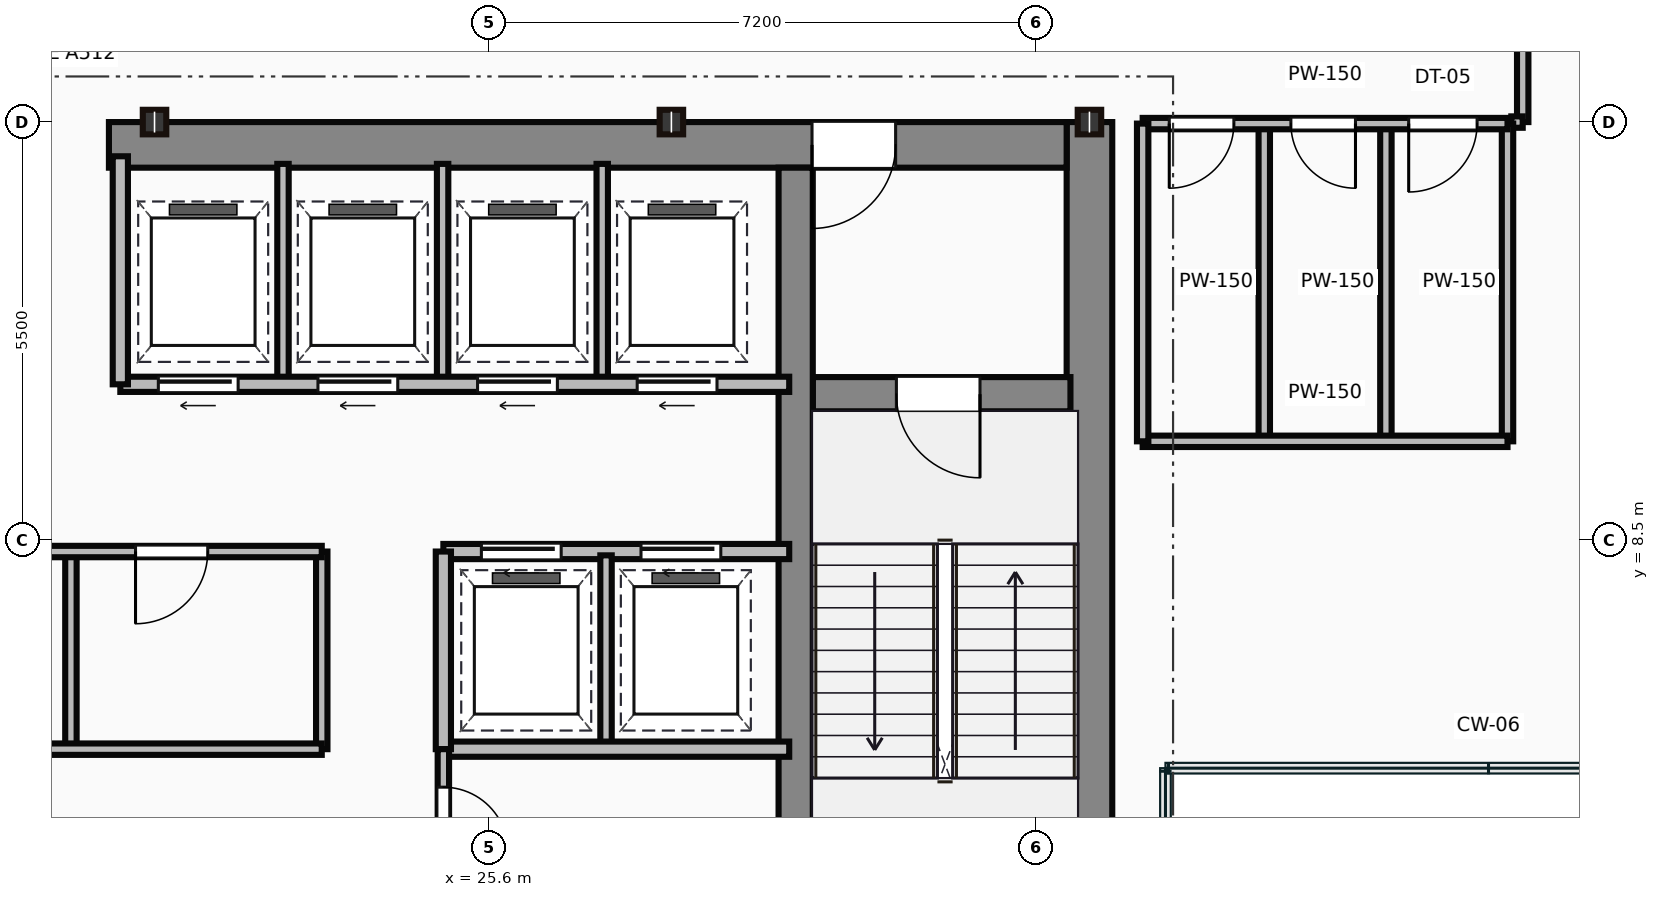
"""IFC4 building model, lengths in metres.
Left out: names, types, materials, properties, quantities, classifications, styles, units other than length and angle.
Written with IfcOpenShell. Run it as: python <this file> out.ifc"""

import sys

from ifc_helpers import new_model, si_unit, direction, frame, frame_2d, origin, origin_2d, place, context, subcontext, project, spatial, rectangle, i_section, extrude, source, transform, mapped, element, fill, save


model = new_model("IFC4")
c1 = context("Model", 3, precision=1e-05, world=origin(), true_north=direction((0.0, 1.0)))
c2 = subcontext(c1, "Body", "Model", "MODEL_VIEW")
j1 = project(units=[si_unit("LENGTHUNIT", "METRE"), si_unit("PLANEANGLEUNIT", "RADIAN")], contexts=[c1])
p1 = place(None, origin())
s1 = spatial("IfcSite", under=j1, at=p1, CompositionType="ELEMENT")
p2 = place(p1, origin())
s2 = spatial("IfcBuilding", under=s1, at=p2, CompositionType="ELEMENT")
p3 = place(p2, frame((0.0, 0.0, 288.0)))
s3 = spatial("IfcBuildingStorey", under=s2, at=p3, CompositionType="ELEMENT", Elevation=288.0)
m1 = source(origin(), c2, "Body", "SweptSolid", [
    extrude(rectangle(XDim=13.1, YDim=0.6, at=frame_2d((6.55, 0.0))), origin(), (0.0, 0.0, 1.0), 4.25),
])
p4 = place(p3, frame((33.5, 0.9, 0.0), z_axis=(0.0, 0.0, 1.0), x_axis=(0.0, 1.0, 0.0)))
e1 = element("IfcWall", 1, at=p4, inside=s3, PredefinedType="SHEAR", context=c2, shape_type="MappedRepresentation", body=[
    mapped(m1, transform((0.0, 0.0, 0.0))),
])
m2 = source(origin(), c2, "Body", "SweptSolid", [
    extrude(rectangle(XDim=12.6, YDim=0.6, at=frame_2d((6.3, 0.0))), origin(), (0.0, 0.0, 1.0), 4.25),
])
p5 = place(p3, frame((20.6, 13.7, 0.0), z_axis=(0.0, 0.0, 1.0), x_axis=(1.0, 0.0, 0.0)))
e2 = element("IfcWall", 2, at=p5, inside=s3, PredefinedType="SHEAR", context=c2, shape_type="MappedRepresentation", body=[
    mapped(m2, transform((0.0, 0.0, 0.0))),
])
p6 = place(p5, frame((9.25, 0.0, 0.0)))
e3 = element("IfcOpeningElement", 3, at=p6, cuts=e2, PredefinedType="OPENING", context=c2, shape_type="SweptSolid", body=[
    extrude(rectangle(XDim=1.1, YDim=2.15, at=frame_2d((0.55, 1.075))), frame((0.0, 0.31, 0.0), z_axis=(0.0, -1.0, 0.0), x_axis=(1.0, 0.0, 0.0)), (0.0, 0.0, 1.0), 0.62),
])
m3 = source(origin(), c2, "Body", "SweptSolid", [
    extrude(rectangle(XDim=12.5, YDim=0.45, at=frame_2d((6.25, 0.0))), origin(), (0.0, 0.0, 1.0), 4.25),
])
p7 = place(p3, frame((29.635, 0.9, 0.0), z_axis=(0.0, 0.0, 1.0), x_axis=(0.0, 1.0, 0.0)))
e4 = element("IfcWall", 4, at=p7, inside=s3, PredefinedType="SHEAR", context=c2, shape_type="MappedRepresentation", body=[
    mapped(m3, transform((0.0, 0.0, 0.0))),
])
m4 = source(origin(), c2, "Body", "SweptSolid", [
    extrude(rectangle(XDim=3.39, YDim=0.45, at=frame_2d((1.695, 0.0))), origin(), (0.0, 0.0, 1.0), 4.25),
])
p8 = place(p3, frame((29.86, 10.42, 0.0), z_axis=(0.0, 0.0, 1.0), x_axis=(1.0, 0.0, 0.0)))
e5 = element("IfcWall", 5, at=p8, inside=s3, PredefinedType="SHEAR", context=c2, shape_type="MappedRepresentation", body=[
    mapped(m4, transform((0.0, 0.0, 0.0))),
])
p9 = place(p8, frame((1.1, 0.0, 0.0)))
e6 = element("IfcOpeningElement", 6, at=p9, cuts=e5, PredefinedType="OPENING", context=c2, shape_type="SweptSolid", body=[
    extrude(rectangle(XDim=1.1, YDim=2.15, at=frame_2d((0.55, 1.075))), frame((0.0, 0.235, 0.0), z_axis=(0.0, -1.0, 0.0), x_axis=(1.0, 0.0, 0.0)), (0.0, 0.0, 1.0), 0.47),
])
m5 = source(origin(), c2, "Body", "SweptSolid", [
    extrude(i_section(OverallWidth=0.309, OverallDepth=0.323, WebThickness=0.014, FlangeThickness=0.023, at=origin_2d()), origin(), (0.0, 0.0, 1.0), 4.25),
])
for number, where, z_axis, x_axis in (
    (7, (21.2, 14.0, 0.0), (0.0, 0.0, 1.0), (1.0, 0.0, 0.0)),
    (8, (28.0, 14.0, 0.0), (0.0, 0.0, 1.0), (1.0, 0.0, 0.0)),
    (9, (33.5, 14.0, 0.0), (0.0, 0.0, 1.0), (1.0, 0.0, 0.0)),
):
    element("IfcColumn", number, at=place(p3, frame(where, z_axis=z_axis, x_axis=x_axis)), inside=s3, PredefinedType="COLUMN", context=c2, shape_type="MappedRepresentation", body=[
        mapped(m5, transform((0.0, 0.0, 0.0))),
    ])
m6 = source(origin(), c2, "Body", "SweptSolid", [
    extrude(rectangle(XDim=11.85, YDim=0.15, at=frame_2d((5.925, 0.0))), origin(), (0.0, 0.0, 1.0), 3.85),
])
p10 = place(p3, frame((11.55, 5.75, 0.0), z_axis=(0.0, 0.0, 1.0), x_axis=(1.0, 0.0, 0.0)))
e10 = element("IfcWall", 10, at=p10, inside=s3, PredefinedType="PARTITIONING", context=c2, shape_type="MappedRepresentation", body=[
    mapped(m6, transform((0.0, 0.0, 0.0))),
])
p11 = place(p3, frame((11.55, 8.35, 0.0), z_axis=(0.0, 0.0, 1.0), x_axis=(1.0, 0.0, 0.0)))
e11 = element("IfcWall", 11, at=p11, inside=s3, PredefinedType="PARTITIONING", context=c2, shape_type="MappedRepresentation", body=[
    mapped(m6, transform((0.0, 0.0, 0.0))),
])
p12 = place(p11, frame((1.1, 0.0, 0.0)))
e12 = element("IfcOpeningElement", 12, at=p12, cuts=e11, PredefinedType="OPENING", context=c2, shape_type="SweptSolid", body=[
    extrude(rectangle(XDim=0.95, YDim=2.15, at=frame_2d((0.475, 1.075))), frame((0.0, 0.085, 0.0), z_axis=(0.0, -1.0, 0.0), x_axis=(1.0, 0.0, 0.0)), (0.0, 0.0, 1.0), 0.17),
])
p13 = place(p11, frame((9.4, 0.0, 0.0)))
e13 = element("IfcOpeningElement", 13, at=p13, cuts=e11, PredefinedType="OPENING", context=c2, shape_type="SweptSolid", body=[
    extrude(rectangle(XDim=0.95, YDim=2.15, at=frame_2d((0.475, 1.075))), frame((0.0, 0.085, 0.0), z_axis=(0.0, -1.0, 0.0), x_axis=(1.0, 0.0, 0.0)), (0.0, 0.0, 1.0), 0.17),
])
m7 = source(origin(), c2, "Body", "SweptSolid", [
    extrude(rectangle(XDim=2.6, YDim=0.15, at=frame_2d((1.3, 0.0))), origin(), (0.0, 0.0, 1.0), 3.85),
])
p14 = place(p3, frame((23.4, 5.75, 0.0), z_axis=(0.0, 0.0, 1.0), x_axis=(0.0, 1.0, 0.0)))
e14 = element("IfcWall", 14, at=p14, inside=s3, PredefinedType="PARTITIONING", context=c2, shape_type="MappedRepresentation", body=[
    mapped(m7, transform((0.0, 0.0, 0.0))),
])
m8 = source(origin(), c2, "Body", "SweptSolid", [
    extrude(rectangle(XDim=2.5, YDim=0.15, at=frame_2d((1.25, 0.0))), origin(), (0.0, 0.0, 1.0), 3.85),
])
p15 = place(p3, frame((20.1, 5.8, 0.0), z_axis=(0.0, 0.0, 1.0), x_axis=(0.0, 1.0, 0.0)))
e15 = element("IfcWall", 15, at=p15, inside=s3, PredefinedType="PARTITIONING", context=c2, shape_type="MappedRepresentation", body=[
    mapped(m8, transform((0.0, 0.0, 0.0))),
])
m9 = source(origin(), c2, "Body", "SweptSolid", [
    extrude(rectangle(XDim=8.8, YDim=0.2, at=frame_2d((4.4, 0.0))), origin(), (0.0, 0.0, 1.0), 3.85),
])
p16 = place(p3, frame((20.75, 10.55, 0.0), z_axis=(0.0, 0.0, 1.0), x_axis=(1.0, 0.0, 0.0)))
e16 = element("IfcWall", 16, at=p16, inside=s3, PredefinedType="PARTITIONING", context=c2, shape_type="MappedRepresentation", body=[
    mapped(m9, transform((0.0, 0.0, 0.0))),
])
p17 = place(p16, frame((0.5, 0.0, 0.0)))
e17 = element("IfcOpeningElement", 17, at=p17, cuts=e16, PredefinedType="OPENING", context=c2, shape_type="SweptSolid", body=[
    extrude(rectangle(XDim=1.05, YDim=2.15, at=frame_2d((0.525, 1.075))), frame((0.0, 0.11, 0.0), z_axis=(0.0, -1.0, 0.0), x_axis=(1.0, 0.0, 0.0)), (0.0, 0.0, 1.0), 0.22),
])
p18 = place(p16, frame((2.6, 0.0, 0.0)))
e18 = element("IfcOpeningElement", 18, at=p18, cuts=e16, PredefinedType="OPENING", context=c2, shape_type="SweptSolid", body=[
    extrude(rectangle(XDim=1.05, YDim=2.15, at=frame_2d((0.525, 1.075))), frame((0.0, 0.11, 0.0), z_axis=(0.0, -1.0, 0.0), x_axis=(1.0, 0.0, 0.0)), (0.0, 0.0, 1.0), 0.22),
])
p19 = place(p16, frame((4.7, 0.0, 0.0)))
e19 = element("IfcOpeningElement", 19, at=p19, cuts=e16, PredefinedType="OPENING", context=c2, shape_type="SweptSolid", body=[
    extrude(rectangle(XDim=1.05, YDim=2.15, at=frame_2d((0.525, 1.075))), frame((0.0, 0.11, 0.0), z_axis=(0.0, -1.0, 0.0), x_axis=(1.0, 0.0, 0.0)), (0.0, 0.0, 1.0), 0.22),
])
p20 = place(p16, frame((6.8, 0.0, 0.0)))
e20 = element("IfcOpeningElement", 20, at=p20, cuts=e16, PredefinedType="OPENING", context=c2, shape_type="SweptSolid", body=[
    extrude(rectangle(XDim=1.05, YDim=2.15, at=frame_2d((0.525, 1.075))), frame((0.0, 0.11, 0.0), z_axis=(0.0, -1.0, 0.0), x_axis=(1.0, 0.0, 0.0)), (0.0, 0.0, 1.0), 0.22),
])
m10 = source(origin(), c2, "Body", "SweptSolid", [
    extrude(rectangle(XDim=3.0, YDim=0.2, at=frame_2d((1.5, 0.0))), origin(), (0.0, 0.0, 1.0), 3.85),
])
p21 = place(p3, frame((20.75, 10.55, 0.0), z_axis=(0.0, 0.0, 1.0), x_axis=(0.0, 1.0, 0.0)))
e21 = element("IfcWall", 21, at=p21, inside=s3, PredefinedType="PARTITIONING", context=c2, shape_type="MappedRepresentation", body=[
    mapped(m10, transform((0.0, 0.0, 0.0))),
])
m11 = source(origin(), c2, "Body", "SweptSolid", [
    extrude(rectangle(XDim=2.85, YDim=0.15, at=frame_2d((1.425, 0.0))), origin(), (0.0, 0.0, 1.0), 3.85),
])
for number, where, z_axis, x_axis in (
    (22, (22.89, 10.6, 0.0), (0.0, 0.0, 1.0), (0.0, 1.0, 0.0)),
    (23, (24.99, 10.6, 0.0), (0.0, 0.0, 1.0), (0.0, 1.0, 0.0)),
    (24, (27.09, 10.6, 0.0), (0.0, 0.0, 1.0), (0.0, 1.0, 0.0)),
):
    element("IfcWall", number, at=place(p3, frame(where, z_axis=z_axis, x_axis=x_axis)), inside=s3, PredefinedType="PARTITIONING", context=c2, shape_type="MappedRepresentation", body=[
        mapped(m11, transform((0.0, 0.0, 0.0))),
    ])
m12 = source(origin(), c2, "Body", "SweptSolid", [
    extrude(rectangle(XDim=4.55, YDim=0.2, at=frame_2d((2.275, 0.0))), origin(), (0.0, 0.0, 1.0), 3.85),
])
p22 = place(p3, frame((25.0, 8.35, 0.0), z_axis=(0.0, 0.0, 1.0), x_axis=(1.0, 0.0, 0.0)))
e25 = element("IfcWall", 25, at=p22, inside=s3, PredefinedType="PARTITIONING", context=c2, shape_type="MappedRepresentation", body=[
    mapped(m12, transform((0.0, 0.0, 0.0))),
])
p23 = place(p22, frame((0.5, 0.0, 0.0)))
e26 = element("IfcOpeningElement", 26, at=p23, cuts=e25, PredefinedType="OPENING", context=c2, shape_type="SweptSolid", body=[
    extrude(rectangle(XDim=1.05, YDim=2.15, at=frame_2d((0.525, 1.075))), frame((0.0, 0.11, 0.0), z_axis=(0.0, -1.0, 0.0), x_axis=(1.0, 0.0, 0.0)), (0.0, 0.0, 1.0), 0.22),
])
p24 = place(p22, frame((2.6, 0.0, 0.0)))
e27 = element("IfcOpeningElement", 27, at=p24, cuts=e25, PredefinedType="OPENING", context=c2, shape_type="SweptSolid", body=[
    extrude(rectangle(XDim=1.05, YDim=2.15, at=frame_2d((0.525, 1.075))), frame((0.0, 0.11, 0.0), z_axis=(0.0, -1.0, 0.0), x_axis=(1.0, 0.0, 0.0)), (0.0, 0.0, 1.0), 0.22),
])
p25 = place(p3, frame((25.0, 5.75, 0.0), z_axis=(0.0, 0.0, 1.0), x_axis=(1.0, 0.0, 0.0)))
e28 = element("IfcWall", 28, at=p25, inside=s3, PredefinedType="PARTITIONING", context=c2, shape_type="MappedRepresentation", body=[
    mapped(m12, transform((0.0, 0.0, 0.0))),
])
m13 = source(origin(), c2, "Body", "SweptSolid", [
    extrude(rectangle(XDim=2.6, YDim=0.2, at=frame_2d((1.3, 0.0))), origin(), (0.0, 0.0, 1.0), 3.85),
])
p26 = place(p3, frame((25.0, 5.75, 0.0), z_axis=(0.0, 0.0, 1.0), x_axis=(0.0, 1.0, 0.0)))
e29 = element("IfcWall", 29, at=p26, inside=s3, PredefinedType="PARTITIONING", context=c2, shape_type="MappedRepresentation", body=[
    mapped(m13, transform((0.0, 0.0, 0.0))),
])
p27 = place(p3, frame((27.14, 5.8, 0.0), z_axis=(0.0, 0.0, 1.0), x_axis=(0.0, 1.0, 0.0)))
e30 = element("IfcWall", 30, at=p27, inside=s3, PredefinedType="PARTITIONING", context=c2, shape_type="MappedRepresentation", body=[
    mapped(m8, transform((0.0, 0.0, 0.0))),
])
m14 = source(origin(), c2, "Body", "SweptSolid", [
    extrude(rectangle(XDim=4.9, YDim=0.15, at=frame_2d((2.45, 0.0))), origin(), (0.0, 0.0, 1.0), 3.85),
])
p28 = place(p3, frame((25.0, 0.85, 0.0), z_axis=(0.0, 0.0, 1.0), x_axis=(0.0, 1.0, 0.0)))
e31 = element("IfcWall", 31, at=p28, inside=s3, PredefinedType="PARTITIONING", context=c2, shape_type="MappedRepresentation", body=[
    mapped(m14, transform((0.0, 0.0, 0.0))),
])
p29 = place(p28, frame((1.85, 0.0, 0.0)))
e32 = element("IfcOpeningElement", 32, at=p29, cuts=e31, PredefinedType="OPENING", context=c2, shape_type="SweptSolid", body=[
    extrude(rectangle(XDim=0.95, YDim=2.15, at=frame_2d((0.475, 1.075))), frame((0.0, 0.085, 0.0), z_axis=(0.0, -1.0, 0.0), x_axis=(1.0, 0.0, 0.0)), (0.0, 0.0, 1.0), 0.17),
])
p30 = place(p28, frame((3.55, 0.0, 0.0)))
e33 = element("IfcOpeningElement", 33, at=p30, cuts=e31, PredefinedType="OPENING", context=c2, shape_type="SweptSolid", body=[
    extrude(rectangle(XDim=0.85, YDim=2.15, at=frame_2d((0.425, 1.075))), frame((0.0, 0.085, 0.0), z_axis=(0.0, -1.0, 0.0), x_axis=(1.0, 0.0, 0.0)), (0.0, 0.0, 1.0), 0.17),
])
m15 = source(origin(), c2, "Body", "SweptSolid", [
    extrude(rectangle(XDim=4.8, YDim=0.15, at=frame_2d((2.4, 0.0))), origin(), (0.0, 0.0, 1.0), 2.845),
])
p31 = place(p3, frame((34.2, 13.98, 0.0), z_axis=(0.0, 0.0, 1.0), x_axis=(1.0, 0.0, 0.0)))
e34 = element("IfcWall", 34, at=p31, inside=s3, PredefinedType="PARTITIONING", context=c2, shape_type="MappedRepresentation", body=[
    mapped(m15, transform((0.0, 0.0, 0.0))),
])
p32 = place(p31, frame((0.35, 0.0, 0.0)))
e35 = element("IfcOpeningElement", 35, at=p32, cuts=e34, PredefinedType="OPENING", context=c2, shape_type="SweptSolid", body=[
    extrude(rectangle(XDim=0.85, YDim=2.1, at=frame_2d((0.425, 1.05))), frame((0.0, 0.085, 0.0), z_axis=(0.0, -1.0, 0.0), x_axis=(1.0, 0.0, 0.0)), (0.0, 0.0, 1.0), 0.17),
])
p33 = place(p31, frame((1.95, 0.0, 0.0)))
e36 = element("IfcOpeningElement", 36, at=p33, cuts=e34, PredefinedType="OPENING", context=c2, shape_type="SweptSolid", body=[
    extrude(rectangle(XDim=0.85, YDim=2.1, at=frame_2d((0.425, 1.05))), frame((0.0, 0.085, 0.0), z_axis=(0.0, -1.0, 0.0), x_axis=(1.0, 0.0, 0.0)), (0.0, 0.0, 1.0), 0.17),
])
p34 = place(p31, frame((3.5, 0.0, 0.0)))
e37 = element("IfcOpeningElement", 37, at=p34, cuts=e34, PredefinedType="OPENING", context=c2, shape_type="SweptSolid", body=[
    extrude(rectangle(XDim=0.9, YDim=2.1, at=frame_2d((0.45, 1.05))), frame((0.0, 0.085, 0.0), z_axis=(0.0, -1.0, 0.0), x_axis=(1.0, 0.0, 0.0)), (0.0, 0.0, 1.0), 0.17),
])
m16 = source(origin(), c2, "Body", "SweptSolid", [
    extrude(rectangle(XDim=4.8, YDim=0.15, at=frame_2d((2.4, 0.0))), origin(), (0.0, 0.0, 1.0), 3.85),
])
p35 = place(p3, frame((34.2, 9.8, 0.0), z_axis=(0.0, 0.0, 1.0), x_axis=(1.0, 0.0, 0.0)))
e38 = element("IfcWall", 38, at=p35, inside=s3, PredefinedType="PARTITIONING", context=c2, shape_type="MappedRepresentation", body=[
    mapped(m16, transform((0.0, 0.0, 0.0))),
])
m17 = source(origin(), c2, "Body", "SweptSolid", [
    extrude(rectangle(XDim=4.18, YDim=0.15, at=frame_2d((2.09, 0.0))), origin(), (0.0, 0.0, 1.0), 3.85),
])
for number, where, z_axis, x_axis in (
    (39, (39.0, 9.8, 0.0), (0.0, 0.0, 1.0), (0.0, 1.0, 0.0)),
    (40, (34.2, 9.8, 0.0), (0.0, 0.0, 1.0), (0.0, 1.0, 0.0)),
    (41, (35.8, 9.8, 0.0), (0.0, 0.0, 1.0), (0.0, 1.0, 0.0)),
    (42, (37.4, 9.8, 0.0), (0.0, 0.0, 1.0), (0.0, 1.0, 0.0)),
):
    element("IfcWall", number, at=place(p3, frame(where, z_axis=z_axis, x_axis=x_axis)), inside=s3, PredefinedType="PARTITIONING", context=c2, shape_type="MappedRepresentation", body=[
        mapped(m17, transform((0.0, 0.0, 0.0))),
    ])
m18 = source(origin(), c2, "Body", "SweptSolid", [
    extrude(rectangle(XDim=2.2, YDim=0.15, at=frame_2d((1.1, 0.0))), origin(), (0.0, 0.0, 1.0), 3.85),
])
p36 = place(p3, frame((39.2, 16.2, 0.0), z_axis=(0.0, 0.0, 1.0), x_axis=(0.0, -1.0, 0.0)))
e43 = element("IfcWall", 43, at=p36, inside=s3, PredefinedType="PARTITIONING", context=c2, shape_type="MappedRepresentation", body=[
    mapped(m18, transform((0.0, 0.0, 0.0))),
])
m19 = source(origin(), c2, "Body", "SweptSolid", [
    extrude(rectangle(XDim=0.15, YDim=0.15, at=frame_2d((0.075, 0.0))), origin(), (0.0, 0.0, 1.0), 3.85),
])
p37 = place(p3, frame((39.2, 14.0, 0.0), z_axis=(0.0, 0.0, 1.0), x_axis=(-1.0, 0.0, 0.0)))
e44 = element("IfcWall", 44, at=p37, inside=s3, PredefinedType="PARTITIONING", context=c2, shape_type="MappedRepresentation", body=[
    mapped(m19, transform((0.0, 0.0, 0.0))),
])
m20 = source(origin(), c2, "Body", "SweptSolid", [
    extrude(rectangle(XDim=1.1, YDim=2.15, at=frame_2d((0.55, 1.075))), frame((0.0, 0.025, 0.0), z_axis=(0.0, -1.0, 0.0), x_axis=(1.0, 0.0, 0.0)), (0.0, 0.0, 1.0), 0.05),
])
p38 = place(p9, frame((1.1, 0.0, 0.0), z_axis=(0.0, 0.0, 1.0), x_axis=(-1.0, 0.0, 0.0)))
e45 = element("IfcDoor", 45, at=p38, inside=s3, OperationType="SINGLE_SWING_RIGHT", PredefinedType="DOOR", context=c2, shape_type="MappedRepresentation", body=[
    mapped(m20, transform((0.0, 0.0, 0.0))),
])
fill(e6, e45)
p39 = place(p6, origin())
e46 = element("IfcDoor", 46, at=p39, inside=s3, OperationType="SINGLE_SWING_LEFT", PredefinedType="DOOR", context=c2, shape_type="MappedRepresentation", body=[
    mapped(m20, transform((0.0, 0.0, 0.0))),
])
fill(e3, e46)
m21 = source(origin(), c2, "Body", "SweptSolid", [
    extrude(rectangle(XDim=0.95, YDim=2.15, at=frame_2d((0.475, 1.075))), frame((0.0, 0.025, 0.0), z_axis=(0.0, -1.0, 0.0), x_axis=(1.0, 0.0, 0.0)), (0.0, 0.0, 1.0), 0.05),
])
p40 = place(p13, origin())
e47 = element("IfcDoor", 47, at=p40, inside=s3, OperationType="SINGLE_SWING_LEFT", PredefinedType="DOOR", context=c2, shape_type="MappedRepresentation", body=[
    mapped(m21, transform((0.0, 0.0, 0.0))),
])
fill(e13, e47)
m22 = source(origin(), c2, "Body", "SweptSolid", [
    extrude(rectangle(XDim=1.05, YDim=2.15, at=frame_2d((0.525, 1.075))), frame((0.0, 0.025, 0.0), z_axis=(0.0, -1.0, 0.0), x_axis=(1.0, 0.0, 0.0)), (0.0, 0.0, 1.0), 0.05),
])
p41 = place(p17, frame((1.05, 0.0, 0.0), z_axis=(0.0, 0.0, 1.0), x_axis=(-1.0, 0.0, 0.0)))
e48 = element("IfcDoor", 48, at=p41, inside=s3, OperationType="SLIDING_TO_LEFT", PredefinedType="DOOR", context=c2, shape_type="MappedRepresentation", body=[
    mapped(m22, transform((0.0, 0.0, 0.0))),
])
fill(e17, e48)
p42 = place(p18, frame((1.05, 0.0, 0.0), z_axis=(0.0, 0.0, 1.0), x_axis=(-1.0, 0.0, 0.0)))
e49 = element("IfcDoor", 49, at=p42, inside=s3, OperationType="SLIDING_TO_LEFT", PredefinedType="DOOR", context=c2, shape_type="MappedRepresentation", body=[
    mapped(m22, transform((0.0, 0.0, 0.0))),
])
fill(e18, e49)
p43 = place(p19, frame((1.05, 0.0, 0.0), z_axis=(0.0, 0.0, 1.0), x_axis=(-1.0, 0.0, 0.0)))
e50 = element("IfcDoor", 50, at=p43, inside=s3, OperationType="SLIDING_TO_LEFT", PredefinedType="DOOR", context=c2, shape_type="MappedRepresentation", body=[
    mapped(m22, transform((0.0, 0.0, 0.0))),
])
fill(e19, e50)
p44 = place(p20, frame((1.05, 0.0, 0.0), z_axis=(0.0, 0.0, 1.0), x_axis=(-1.0, 0.0, 0.0)))
e51 = element("IfcDoor", 51, at=p44, inside=s3, OperationType="SLIDING_TO_LEFT", PredefinedType="DOOR", context=c2, shape_type="MappedRepresentation", body=[
    mapped(m22, transform((0.0, 0.0, 0.0))),
])
fill(e20, e51)
p45 = place(p23, origin())
e52 = element("IfcDoor", 52, at=p45, inside=s3, OperationType="SLIDING_TO_LEFT", PredefinedType="DOOR", context=c2, shape_type="MappedRepresentation", body=[
    mapped(m22, transform((0.0, 0.0, 0.0))),
])
fill(e26, e52)
p46 = place(p24, origin())
e53 = element("IfcDoor", 53, at=p46, inside=s3, OperationType="SLIDING_TO_LEFT", PredefinedType="DOOR", context=c2, shape_type="MappedRepresentation", body=[
    mapped(m22, transform((0.0, 0.0, 0.0))),
])
fill(e27, e53)
m23 = source(origin(), c2, "Body", "SweptSolid", [
    extrude(rectangle(XDim=0.85, YDim=2.15, at=frame_2d((0.425, 1.075))), frame((0.0, 0.025, 0.0), z_axis=(0.0, -1.0, 0.0), x_axis=(1.0, 0.0, 0.0)), (0.0, 0.0, 1.0), 0.05),
])
p47 = place(p30, origin())
e54 = element("IfcDoor", 54, at=p47, inside=s3, OperationType="SINGLE_SWING_LEFT", PredefinedType="DOOR", context=c2, shape_type="MappedRepresentation", body=[
    mapped(m23, transform((0.0, 0.0, 0.0))),
])
fill(e33, e54)
m24 = source(origin(), c2, "Body", "SweptSolid", [
    extrude(rectangle(XDim=0.85, YDim=2.1, at=frame_2d((0.425, 1.05))), frame((0.0, 0.025, 0.0), z_axis=(0.0, -1.0, 0.0), x_axis=(1.0, 0.0, 0.0)), (0.0, 0.0, 1.0), 0.05),
])
p48 = place(p32, frame((0.85, 0.0, 0.0), z_axis=(0.0, 0.0, 1.0), x_axis=(-1.0, 0.0, 0.0)))
e55 = element("IfcDoor", 55, at=p48, inside=s3, OperationType="SINGLE_SWING_LEFT", PredefinedType="DOOR", context=c2, shape_type="MappedRepresentation", body=[
    mapped(m24, transform((0.0, 0.0, 0.0))),
])
fill(e35, e55)
p49 = place(p33, frame((0.85, 0.0, 0.0), z_axis=(0.0, 0.0, 1.0), x_axis=(-1.0, 0.0, 0.0)))
e56 = element("IfcDoor", 56, at=p49, inside=s3, OperationType="SINGLE_SWING_RIGHT", PredefinedType="DOOR", context=c2, shape_type="MappedRepresentation", body=[
    mapped(m24, transform((0.0, 0.0, 0.0))),
])
fill(e36, e56)
m25 = source(origin(), c2, "Body", "SweptSolid", [
    extrude(rectangle(XDim=0.9, YDim=2.1, at=frame_2d((0.45, 1.05))), frame((0.0, 0.025, 0.0), z_axis=(0.0, -1.0, 0.0), x_axis=(1.0, 0.0, 0.0)), (0.0, 0.0, 1.0), 0.05),
])
p50 = place(p34, frame((0.9, 0.0, 0.0), z_axis=(0.0, 0.0, 1.0), x_axis=(-1.0, 0.0, 0.0)))
e57 = element("IfcDoor", 57, at=p50, inside=s3, OperationType="SINGLE_SWING_LEFT", PredefinedType="DOOR", context=c2, shape_type="MappedRepresentation", body=[
    mapped(m25, transform((0.0, 0.0, 0.0))),
])
fill(e37, e57)
save(model, sys.argv[1])
